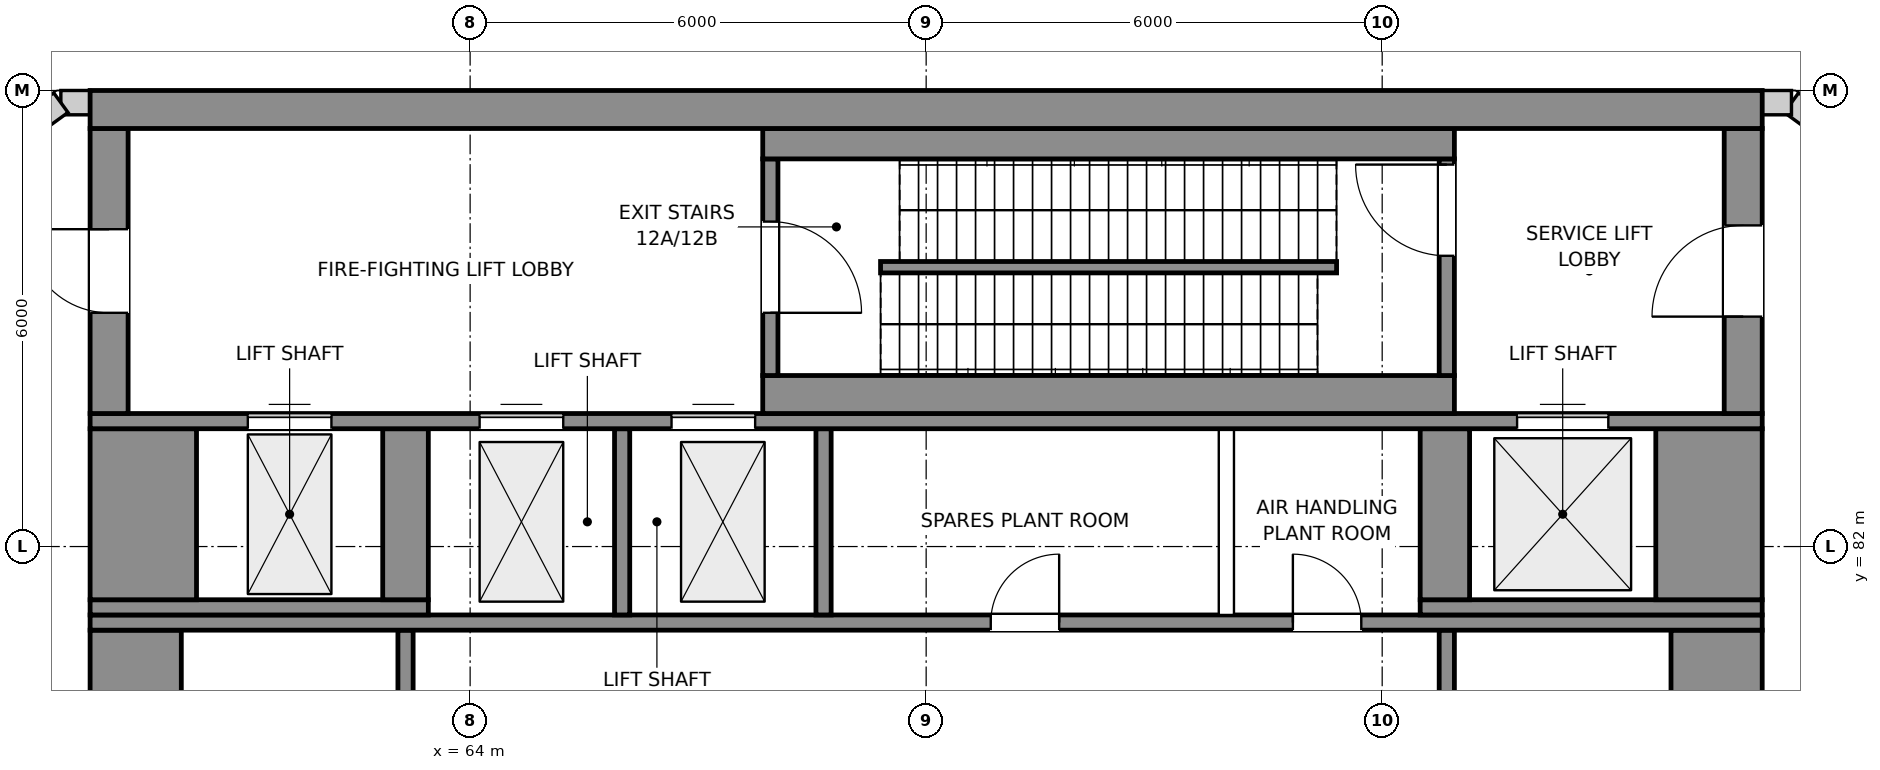
"""IFC4 building model, lengths in metres.
Left out: names, types, materials, properties, quantities, classifications, styles, units other than length and angle.
Written with IfcOpenShell. Run it as: python <this file> out.ifc"""

import sys

from ifc_helpers import new_model, si_unit, direction, frame, frame_2d, origin, place, context, subcontext, project, spatial, rectangle, extrude, element, fill, save


model = new_model("IFC4")
c1 = context("Model", 3, precision=1e-05, world=origin(), true_north=direction((0.0, 1.0)))
c2 = subcontext(c1, "Body", "Model", "MODEL_VIEW")
j1 = project(units=[si_unit("LENGTHUNIT", "METRE"), si_unit("PLANEANGLEUNIT", "RADIAN")], contexts=[c1])
p1 = place(None, origin())
s1 = spatial("IfcSite", under=j1, at=p1, CompositionType="ELEMENT")
p2 = place(p1, origin())
s2 = spatial("IfcBuilding", under=s1, at=p2, CompositionType="ELEMENT")
p3 = place(p2, frame((0.0, 0.0, 337.7)))
s3 = spatial("IfcBuildingStorey", under=s2, at=p3, CompositionType="ELEMENT", Elevation=337.7)
p4 = place(p3, frame((85.359, 84.953, 0.0), z_axis=(0.0, 0.0, 1.0), x_axis=(-0.809008941667, 0.587796335735, 0.0)))
e1 = element("IfcWall", 1, at=p4, inside=s3, PredefinedType="SOLIDWALL", context=c2, shape_type="SweptSolid", body=[
    extrude(rectangle(XDim=4.912, YDim=0.32, at=frame_2d((2.456, 0.0))), origin(), (0.0, 0.0, 1.0), 4.2),
])
for number, where, z_axis, x_axis in (
    (2, (81.385, 87.84, 0.0), (0.0, 0.0, 1.0), (-1.0, 0.0, 0.0)),
    (3, (59.0, 87.84, 0.0), (0.0, 0.0, 1.0), (-1.0, 0.0, 0.0)),
):
    element("IfcWall", number, at=place(p3, frame(where, z_axis=z_axis, x_axis=x_axis)), inside=s3, PredefinedType="SOLIDWALL", context=c2, shape_type="SweptSolid", body=[
        extrude(rectangle(XDim=0.385, YDim=0.32, at=frame_2d((0.192, 0.0))), origin(), (0.0, 0.0, 1.0), 4.2),
    ])
p5 = place(p3, frame((58.615, 87.84, 0.0), z_axis=(0.0, 0.0, 1.0), x_axis=(-0.809008941667, -0.587796335735, 0.0)))
e4 = element("IfcWall", 4, at=p5, inside=s3, PredefinedType="SOLIDWALL", context=c2, shape_type="SweptSolid", body=[
    extrude(rectangle(XDim=4.912, YDim=0.32, at=frame_2d((2.456, 0.0))), origin(), (0.0, 0.0, 1.0), 4.2),
])
for number, where, z_axis, x_axis in (
    (5, (59.6, 71.5, 0.0), (0.0, 0.0, 1.0), (0.0, 1.0, 0.0)),
    (6, (80.4, 71.5, 0.0), (0.0, 0.0, 1.0), (0.0, 1.0, 0.0)),
):
    element("IfcWall", number, at=place(p3, frame(where, z_axis=z_axis, x_axis=x_axis)), inside=s3, PredefinedType="SHEAR", context=c2, shape_type="SweptSolid", body=[
        extrude(rectangle(XDim=9.4, YDim=1.2, at=frame_2d((4.7, 0.0))), origin(), (0.0, 0.0, 1.0), 4.5),
    ])
for number, where, z_axis, x_axis in (
    (7, (63.15, 77.7, 0.0), (0.0, 0.0, 1.0), (0.0, 1.0, 0.0)),
    (8, (76.85, 77.7, 0.0), (0.0, 0.0, 1.0), (0.0, 1.0, 0.0)),
):
    element("IfcWall", number, at=place(p3, frame(where, z_axis=z_axis, x_axis=x_axis)), inside=s3, PredefinedType="SHEAR", context=c2, shape_type="SweptSolid", body=[
        extrude(rectangle(XDim=3.2, YDim=0.2, at=frame_2d((1.6, 0.0))), origin(), (0.0, 0.0, 1.0), 4.5),
    ])
p6 = place(p3, frame((59.0, 81.0, 0.0), z_axis=(0.0, 0.0, 1.0), x_axis=(1.0, 0.0, 0.0)))
e9 = element("IfcWall", 9, at=p6, inside=s3, PredefinedType="SHEAR", context=c2, shape_type="SweptSolid", body=[
    extrude(rectangle(XDim=22.0, YDim=0.2, at=frame_2d((11.0, 0.0))), origin(), (0.0, 0.0, 1.0), 4.5),
])
p7 = place(p6, frame((11.85, 0.0, 0.0)))
e10 = element("IfcOpeningElement", 10, at=p7, cuts=e9, PredefinedType="OPENING", context=c2, shape_type="SweptSolid", body=[
    extrude(rectangle(XDim=0.9, YDim=2.1, at=frame_2d((0.45, 1.05))), frame((0.0, 0.11, 0.0), z_axis=(0.0, -1.0, 0.0), x_axis=(1.0, 0.0, 0.0)), (0.0, 0.0, 1.0), 0.22),
])
p8 = place(p6, frame((15.825, 0.0, 0.0)))
e11 = element("IfcOpeningElement", 11, at=p8, cuts=e9, PredefinedType="OPENING", context=c2, shape_type="SweptSolid", body=[
    extrude(rectangle(XDim=0.9, YDim=2.1, at=frame_2d((0.45, 1.05))), frame((0.0, 0.11, 0.0), z_axis=(0.0, -1.0, 0.0), x_axis=(1.0, 0.0, 0.0)), (0.0, 0.0, 1.0), 0.22),
])
p9 = place(p3, frame((59.0, 81.2, 0.0), z_axis=(0.0, 0.0, 1.0), x_axis=(1.0, 0.0, 0.0)))
e12 = element("IfcWall", 12, at=p9, inside=s3, PredefinedType="SHEAR", context=c2, shape_type="SweptSolid", body=[
    extrude(rectangle(XDim=4.45, YDim=0.2, at=frame_2d((2.225, 0.0))), origin(), (0.0, 0.0, 1.0), 4.5),
])
for number, where, z_axis, x_axis in (
    (13, (66.0, 81.1, 0.0), (0.0, 0.0, 1.0), (0.0, 1.0, 0.0)),
    (14, (68.65, 81.1, 0.0), (0.0, 0.0, 1.0), (0.0, 1.0, 0.0)),
):
    element("IfcWall", number, at=place(p3, frame(where, z_axis=z_axis, x_axis=x_axis)), inside=s3, PredefinedType="SHEAR", context=c2, shape_type="SweptSolid", body=[
        extrude(rectangle(XDim=2.45, YDim=0.2, at=frame_2d((1.225, 0.0))), origin(), (0.0, 0.0, 1.0), 4.5),
    ])
p10 = place(p3, frame((73.95, 81.1, 0.0), z_axis=(0.0, 0.0, 1.0), x_axis=(0.0, 1.0, 0.0)))
e15 = element("IfcWall", 15, at=p10, inside=s3, PredefinedType="PARTITIONING", context=c2, shape_type="SweptSolid", body=[
    extrude(rectangle(XDim=2.45, YDim=0.2, at=frame_2d((1.225, 0.0))), origin(), (0.0, 0.0, 1.0), 4.2),
])
p11 = place(p3, frame((76.5, 81.2, 0.0), z_axis=(0.0, 0.0, 1.0), x_axis=(1.0, 0.0, 0.0)))
e16 = element("IfcWall", 16, at=p11, inside=s3, PredefinedType="SHEAR", context=c2, shape_type="SweptSolid", body=[
    extrude(rectangle(XDim=4.5, YDim=0.2, at=frame_2d((2.25, 0.0))), origin(), (0.0, 0.0, 1.0), 4.5),
])
p12 = place(p3, frame((59.7, 81.3, 0.0), z_axis=(0.0, 0.0, 1.0), x_axis=(0.0, 1.0, 0.0)))
e17 = element("IfcWall", 17, at=p12, inside=s3, PredefinedType="SHEAR", context=c2, shape_type="SweptSolid", body=[
    extrude(rectangle(XDim=2.25, YDim=1.4, at=frame_2d((1.125, 0.0))), origin(), (0.0, 0.0, 1.0), 4.5),
])
p13 = place(p3, frame((63.15, 81.3, 0.0), z_axis=(0.0, 0.0, 1.0), x_axis=(0.0, 1.0, 0.0)))
e18 = element("IfcWall", 18, at=p13, inside=s3, PredefinedType="SHEAR", context=c2, shape_type="SweptSolid", body=[
    extrude(rectangle(XDim=2.25, YDim=0.6, at=frame_2d((1.125, 0.0))), origin(), (0.0, 0.0, 1.0), 4.5),
])
p14 = place(p3, frame((76.825, 81.3, 0.0), z_axis=(0.0, 0.0, 1.0), x_axis=(0.0, 1.0, 0.0)))
e19 = element("IfcWall", 19, at=p14, inside=s3, PredefinedType="SHEAR", context=c2, shape_type="SweptSolid", body=[
    extrude(rectangle(XDim=2.25, YDim=0.65, at=frame_2d((1.125, 0.0))), origin(), (0.0, 0.0, 1.0), 4.5),
])
p15 = place(p3, frame((80.3, 81.3, 0.0), z_axis=(0.0, 0.0, 1.0), x_axis=(0.0, 1.0, 0.0)))
e20 = element("IfcWall", 20, at=p15, inside=s3, PredefinedType="SHEAR", context=c2, shape_type="SweptSolid", body=[
    extrude(rectangle(XDim=2.25, YDim=1.4, at=frame_2d((1.125, 0.0))), origin(), (0.0, 0.0, 1.0), 4.5),
])
p16 = place(p3, frame((59.0, 83.65, 0.0), z_axis=(0.0, 0.0, 1.0), x_axis=(1.0, 0.0, 0.0)))
e21 = element("IfcWall", 21, at=p16, inside=s3, PredefinedType="SHEAR", context=c2, shape_type="SweptSolid", body=[
    extrude(rectangle(XDim=22.0, YDim=0.2, at=frame_2d((11.0, 0.0))), origin(), (0.0, 0.0, 1.0), 4.5),
])
p17 = place(p16, frame((5.125, 0.0, 0.0)))
e22 = element("IfcOpeningElement", 22, at=p17, cuts=e21, PredefinedType="OPENING", context=c2, shape_type="SweptSolid", body=[
    extrude(rectangle(XDim=1.1, YDim=2.1, at=frame_2d((0.55, 1.05))), frame((0.0, 0.11, 0.0), z_axis=(0.0, -1.0, 0.0), x_axis=(1.0, 0.0, 0.0)), (0.0, 0.0, 1.0), 0.22),
])
p18 = place(p16, frame((7.65, 0.0, 0.0)))
e23 = element("IfcOpeningElement", 23, at=p18, cuts=e21, PredefinedType="OPENING", context=c2, shape_type="SweptSolid", body=[
    extrude(rectangle(XDim=1.1, YDim=2.1, at=frame_2d((0.55, 1.05))), frame((0.0, 0.11, 0.0), z_axis=(0.0, -1.0, 0.0), x_axis=(1.0, 0.0, 0.0)), (0.0, 0.0, 1.0), 0.22),
])
p19 = place(p16, frame((18.775, 0.0, 0.0)))
e24 = element("IfcOpeningElement", 24, at=p19, cuts=e21, PredefinedType="OPENING", context=c2, shape_type="SweptSolid", body=[
    extrude(rectangle(XDim=1.2, YDim=2.1, at=frame_2d((0.6, 1.05))), frame((0.0, 0.11, 0.0), z_axis=(0.0, -1.0, 0.0), x_axis=(1.0, 0.0, 0.0)), (0.0, 0.0, 1.0), 0.22),
])
p20 = place(p16, frame((2.075, 0.0, 0.0)))
e25 = element("IfcOpeningElement", 25, at=p20, cuts=e21, PredefinedType="OPENING", context=c2, shape_type="SweptSolid", body=[
    extrude(rectangle(XDim=1.1, YDim=2.1, at=frame_2d((0.55, 1.05))), frame((0.0, 0.11, 0.0), z_axis=(0.0, -1.0, 0.0), x_axis=(1.0, 0.0, 0.0)), (0.0, 0.0, 1.0), 0.22),
])
p21 = place(p3, frame((59.25, 83.75, 0.0), z_axis=(0.0, 0.0, 1.0), x_axis=(0.0, 1.0, 0.0)))
e26 = element("IfcWall", 26, at=p21, inside=s3, PredefinedType="SHEAR", context=c2, shape_type="SweptSolid", body=[
    extrude(rectangle(XDim=3.75, YDim=0.5, at=frame_2d((1.875, 0.0))), origin(), (0.0, 0.0, 1.0), 4.5),
])
p22 = place(p21, frame((1.325, 0.0, 0.0)))
e27 = element("IfcOpeningElement", 27, at=p22, cuts=e26, PredefinedType="OPENING", context=c2, shape_type="SweptSolid", body=[
    extrude(rectangle(XDim=1.1, YDim=2.1, at=frame_2d((0.55, 1.05))), frame((0.0, 0.26, 0.0), z_axis=(0.0, -1.0, 0.0), x_axis=(1.0, 0.0, 0.0)), (0.0, 0.0, 1.0), 0.52),
])
p23 = place(p3, frame((67.85, 84.0, 0.0), z_axis=(0.0, 0.0, 1.0), x_axis=(1.0, 0.0, 0.0)))
e28 = element("IfcWall", 28, at=p23, inside=s3, PredefinedType="SHEAR", context=c2, shape_type="SweptSolid", body=[
    extrude(rectangle(XDim=9.1, YDim=0.5, at=frame_2d((4.55, 0.0))), origin(), (0.0, 0.0, 1.0), 4.5),
])
p24 = place(p3, frame((80.75, 83.75, 0.0), z_axis=(0.0, 0.0, 1.0), x_axis=(0.0, 1.0, 0.0)))
e29 = element("IfcWall", 29, at=p24, inside=s3, PredefinedType="SHEAR", context=c2, shape_type="SweptSolid", body=[
    extrude(rectangle(XDim=3.75, YDim=0.5, at=frame_2d((1.875, 0.0))), origin(), (0.0, 0.0, 1.0), 4.5),
])
p25 = place(p24, frame((1.275, 0.0, 0.0)))
e30 = element("IfcOpeningElement", 30, at=p25, cuts=e29, PredefinedType="OPENING", context=c2, shape_type="SweptSolid", body=[
    extrude(rectangle(XDim=1.2, YDim=2.1, at=frame_2d((0.6, 1.05))), frame((0.0, 0.26, 0.0), z_axis=(0.0, -1.0, 0.0), x_axis=(1.0, 0.0, 0.0)), (0.0, 0.0, 1.0), 0.52),
])
p26 = place(p3, frame((67.95, 84.25, 0.0), z_axis=(0.0, 0.0, 1.0), x_axis=(0.0, 1.0, 0.0)))
e31 = element("IfcWall", 31, at=p26, inside=s3, PredefinedType="SHEAR", context=c2, shape_type="SweptSolid", body=[
    extrude(rectangle(XDim=2.85, YDim=0.2, at=frame_2d((1.425, 0.0))), origin(), (0.0, 0.0, 1.0), 4.5),
])
p27 = place(p26, frame((0.825, 0.0, 0.0)))
e32 = element("IfcOpeningElement", 32, at=p27, cuts=e31, PredefinedType="OPENING", context=c2, shape_type="SweptSolid", body=[
    extrude(rectangle(XDim=1.2, YDim=2.1, at=frame_2d((0.6, 1.05))), frame((0.0, 0.11, 0.0), z_axis=(0.0, -1.0, 0.0), x_axis=(1.0, 0.0, 0.0)), (0.0, 0.0, 1.0), 0.22),
])
p28 = place(p3, frame((76.85, 84.25, 0.0), z_axis=(0.0, 0.0, 1.0), x_axis=(0.0, 1.0, 0.0)))
e33 = element("IfcWall", 33, at=p28, inside=s3, PredefinedType="SHEAR", context=c2, shape_type="SweptSolid", body=[
    extrude(rectangle(XDim=2.85, YDim=0.2, at=frame_2d((1.425, 0.0))), origin(), (0.0, 0.0, 1.0), 4.5),
])
p29 = place(p28, frame((1.575, 0.0, 0.0)))
e34 = element("IfcOpeningElement", 34, at=p29, cuts=e33, PredefinedType="OPENING", context=c2, shape_type="SweptSolid", body=[
    extrude(rectangle(XDim=1.2, YDim=2.1, at=frame_2d((0.6, 1.05))), frame((0.0, 0.11, 0.0), z_axis=(0.0, -1.0, 0.0), x_axis=(1.0, 0.0, 0.0)), (0.0, 0.0, 1.0), 0.22),
])
p30 = place(p3, frame((67.85, 87.3, 0.0), z_axis=(0.0, 0.0, 1.0), x_axis=(1.0, 0.0, 0.0)))
e35 = element("IfcWall", 35, at=p30, inside=s3, PredefinedType="SHEAR", context=c2, shape_type="SweptSolid", body=[
    extrude(rectangle(XDim=9.1, YDim=0.4, at=frame_2d((4.55, 0.0))), origin(), (0.0, 0.0, 1.0), 4.5),
])
p31 = place(p3, frame((59.0, 87.75, 0.0), z_axis=(0.0, 0.0, 1.0), x_axis=(1.0, 0.0, 0.0)))
e36 = element("IfcWall", 36, at=p31, inside=s3, PredefinedType="SHEAR", context=c2, shape_type="SweptSolid", body=[
    extrude(rectangle(XDim=22.0, YDim=0.5, at=frame_2d((11.0, 0.0))), origin(), (0.0, 0.0, 1.0), 4.5),
])
p32 = place(p3, frame((69.4, 85.675, 0.0), z_axis=(0.0, 0.0, 1.0), x_axis=(1.0, 0.0, 0.0)))
e37 = element("IfcWall", 37, at=p32, inside=s3, PredefinedType="SHEAR", context=c2, shape_type="SweptSolid", body=[
    extrude(rectangle(XDim=6.0, YDim=0.15, at=frame_2d((3.0, 0.0))), origin(), (0.0, 0.0, 1.0), 4.5),
])
p33 = place(p27, frame((1.2, 0.0, 0.0), z_axis=(0.0, 0.0, 1.0), x_axis=(-1.0, 0.0, 0.0)))
e38 = element("IfcDoor", 38, at=p33, inside=s3, OperationType="SINGLE_SWING_RIGHT", PredefinedType="DOOR", context=c2, shape_type="SweptSolid", body=[
    extrude(rectangle(XDim=1.2, YDim=2.1, at=frame_2d((0.6, 1.05))), frame((0.0, 0.025, 0.0), z_axis=(0.0, -1.0, 0.0), x_axis=(1.0, 0.0, 0.0)), (0.0, 0.0, 1.0), 0.05),
])
fill(e32, e38)
p34 = place(p29, origin())
e39 = element("IfcDoor", 39, at=p34, inside=s3, OperationType="SINGLE_SWING_RIGHT", PredefinedType="DOOR", context=c2, shape_type="SweptSolid", body=[
    extrude(rectangle(XDim=1.2, YDim=2.1, at=frame_2d((0.6, 1.05))), frame((0.0, 0.025, 0.0), z_axis=(0.0, -1.0, 0.0), x_axis=(1.0, 0.0, 0.0)), (0.0, 0.0, 1.0), 0.05),
])
fill(e34, e39)
p35 = place(p22, origin())
e40 = element("IfcDoor", 40, at=p35, inside=s3, OperationType="SINGLE_SWING_RIGHT", PredefinedType="DOOR", context=c2, shape_type="SweptSolid", body=[
    extrude(rectangle(XDim=1.1, YDim=2.1, at=frame_2d((0.55, 1.05))), frame((0.0, 0.025, 0.0), z_axis=(0.0, -1.0, 0.0), x_axis=(1.0, 0.0, 0.0)), (0.0, 0.0, 1.0), 0.05),
])
fill(e27, e40)
p36 = place(p25, origin())
e41 = element("IfcDoor", 41, at=p36, inside=s3, OperationType="SINGLE_SWING_LEFT", PredefinedType="DOOR", context=c2, shape_type="SweptSolid", body=[
    extrude(rectangle(XDim=1.2, YDim=2.1, at=frame_2d((0.6, 1.05))), frame((0.0, 0.025, 0.0), z_axis=(0.0, -1.0, 0.0), x_axis=(1.0, 0.0, 0.0)), (0.0, 0.0, 1.0), 0.05),
])
fill(e30, e41)
p37 = place(p17, origin())
e42 = element("IfcDoor", 42, at=p37, inside=s3, OperationType="DOUBLE_DOOR_SLIDING", PredefinedType="DOOR", context=c2, shape_type="SweptSolid", body=[
    extrude(rectangle(XDim=1.1, YDim=2.1, at=frame_2d((0.55, 1.05))), frame((0.0, 0.025, 0.0), z_axis=(0.0, -1.0, 0.0), x_axis=(1.0, 0.0, 0.0)), (0.0, 0.0, 1.0), 0.05),
])
fill(e22, e42)
p38 = place(p18, origin())
e43 = element("IfcDoor", 43, at=p38, inside=s3, OperationType="DOUBLE_DOOR_SLIDING", PredefinedType="DOOR", context=c2, shape_type="SweptSolid", body=[
    extrude(rectangle(XDim=1.1, YDim=2.1, at=frame_2d((0.55, 1.05))), frame((0.0, 0.025, 0.0), z_axis=(0.0, -1.0, 0.0), x_axis=(1.0, 0.0, 0.0)), (0.0, 0.0, 1.0), 0.05),
])
fill(e23, e43)
p39 = place(p19, origin())
e44 = element("IfcDoor", 44, at=p39, inside=s3, OperationType="DOUBLE_DOOR_SLIDING", PredefinedType="DOOR", context=c2, shape_type="SweptSolid", body=[
    extrude(rectangle(XDim=1.2, YDim=2.1, at=frame_2d((0.6, 1.05))), frame((0.0, 0.025, 0.0), z_axis=(0.0, -1.0, 0.0), x_axis=(1.0, 0.0, 0.0)), (0.0, 0.0, 1.0), 0.05),
])
fill(e24, e44)
p40 = place(p20, origin())
e45 = element("IfcDoor", 45, at=p40, inside=s3, OperationType="DOUBLE_DOOR_SLIDING", PredefinedType="DOOR", context=c2, shape_type="SweptSolid", body=[
    extrude(rectangle(XDim=1.1, YDim=2.1, at=frame_2d((0.55, 1.05))), frame((0.0, 0.025, 0.0), z_axis=(0.0, -1.0, 0.0), x_axis=(1.0, 0.0, 0.0)), (0.0, 0.0, 1.0), 0.05),
])
fill(e25, e45)
p41 = place(p7, origin())
e46 = element("IfcDoor", 46, at=p41, inside=s3, OperationType="SINGLE_SWING_RIGHT", PredefinedType="DOOR", context=c2, shape_type="SweptSolid", body=[
    extrude(rectangle(XDim=0.9, YDim=2.1, at=frame_2d((0.45, 1.05))), frame((0.0, 0.025, 0.0), z_axis=(0.0, -1.0, 0.0), x_axis=(1.0, 0.0, 0.0)), (0.0, 0.0, 1.0), 0.05),
])
fill(e10, e46)
p42 = place(p8, origin())
e47 = element("IfcDoor", 47, at=p42, inside=s3, OperationType="SINGLE_SWING_LEFT", PredefinedType="DOOR", context=c2, shape_type="SweptSolid", body=[
    extrude(rectangle(XDim=0.9, YDim=2.1, at=frame_2d((0.45, 1.05))), frame((0.0, 0.025, 0.0), z_axis=(0.0, -1.0, 0.0), x_axis=(1.0, 0.0, 0.0)), (0.0, 0.0, 1.0), 0.05),
])
fill(e11, e47)
save(model, sys.argv[1])
